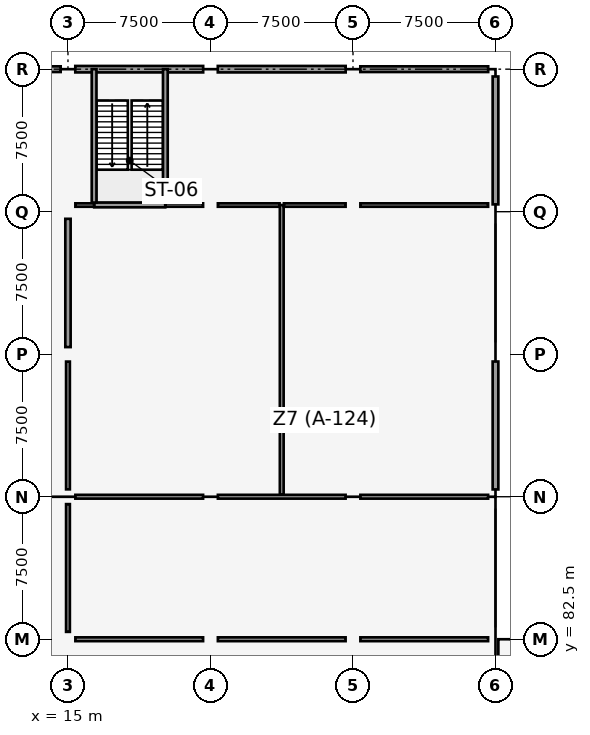
"""IFC4 building model, lengths in metres.
Left out: names, types, materials, properties, quantities, classifications, styles, units other than length and angle.
Written with IfcOpenShell. Run it as: python <this file> out.ifc"""

import sys

from ifc_helpers import new_model, si_unit, direction, frame, frame_2d, origin, origin_2d, place, context, subcontext, project, spatial, rectangle, extrude, element, fill, save


model = new_model("IFC4")
c1 = context("Model", 3, precision=1e-05, world=origin(), true_north=direction((0.0, 1.0)))
c2 = subcontext(c1, "Body", "Model", "MODEL_VIEW")
j1 = project(units=[si_unit("LENGTHUNIT", "METRE"), si_unit("PLANEANGLEUNIT", "RADIAN")], contexts=[c1])
p1 = place(None, origin())
s1 = spatial("IfcSite", under=j1, at=p1, CompositionType="ELEMENT")
p2 = place(p1, origin())
s2 = spatial("IfcBuilding", under=s1, at=p2, CompositionType="ELEMENT")
p3 = place(p2, origin())
s3 = spatial("IfcBuildingStorey", under=s2, at=p3, CompositionType="ELEMENT", Elevation=0.0)
for number, where, z_axis, x_axis in (
    (1, (15.0, 82.5, 0.0), (0.0, 0.0, 1.0), (1.0, 0.0, 0.0)),
    (2, (15.0, 90.0, 0.0), (0.0, 0.0, 1.0), (1.0, 0.0, 0.0)),
    (3, (15.0, 97.5, 0.0), (0.0, 0.0, 1.0), (1.0, 0.0, 0.0)),
    (4, (15.0, 105.0, 0.0), (0.0, 0.0, 1.0), (1.0, 0.0, 0.0)),
    (5, (15.0, 112.5, 0.0), (0.0, 0.0, 1.0), (1.0, 0.0, 0.0)),
    (6, (22.5, 82.5, 0.0), (0.0, 0.0, 1.0), (1.0, 0.0, 0.0)),
    (7, (22.5, 90.0, 0.0), (0.0, 0.0, 1.0), (1.0, 0.0, 0.0)),
    (8, (22.5, 97.5, 0.0), (0.0, 0.0, 1.0), (1.0, 0.0, 0.0)),
    (9, (22.5, 105.0, 0.0), (0.0, 0.0, 1.0), (1.0, 0.0, 0.0)),
    (10, (22.5, 112.5, 0.0), (0.0, 0.0, 1.0), (1.0, 0.0, 0.0)),
    (11, (30.0, 82.5, 0.0), (0.0, 0.0, 1.0), (1.0, 0.0, 0.0)),
    (12, (30.0, 90.0, 0.0), (0.0, 0.0, 1.0), (1.0, 0.0, 0.0)),
    (13, (30.0, 97.5, 0.0), (0.0, 0.0, 1.0), (1.0, 0.0, 0.0)),
    (14, (30.0, 105.0, 0.0), (0.0, 0.0, 1.0), (1.0, 0.0, 0.0)),
    (15, (30.0, 112.5, 0.0), (0.0, 0.0, 1.0), (1.0, 0.0, 0.0)),
    (16, (37.5, 82.5, 0.0), (0.0, 0.0, 1.0), (1.0, 0.0, 0.0)),
    (17, (37.5, 90.0, 0.0), (0.0, 0.0, 1.0), (1.0, 0.0, 0.0)),
    (18, (37.5, 97.5, 0.0), (0.0, 0.0, 1.0), (1.0, 0.0, 0.0)),
    (19, (37.5, 105.0, 0.0), (0.0, 0.0, 1.0), (1.0, 0.0, 0.0)),
    (20, (37.5, 112.5, 0.0), (0.0, 0.0, 1.0), (1.0, 0.0, 0.0)),
):
    element("IfcColumn", number, at=place(p3, frame(where, z_axis=z_axis, x_axis=x_axis)), inside=s3, PredefinedType="COLUMN", context=c2, shape_type="SweptSolid", body=[
        extrude(rectangle(XDim=0.75, YDim=0.75, at=origin_2d()), origin(), (0.0, 0.0, 1.0), 4.8),
    ])
p4 = place(p3, frame((15.0, 97.875, 0.0), z_axis=(0.0, 0.0, 1.0), x_axis=(0.0, 1.0, 0.0)))
e21 = element("IfcWall", 21, at=p4, inside=s3, PredefinedType="SHEAR", context=c2, shape_type="SweptSolid", body=[
    extrude(rectangle(XDim=6.75, YDim=0.28, at=frame_2d((3.375, 0.0))), origin(), (0.0, 0.0, 1.0), 4.5),
])
p5 = place(p3, frame((8.12, 112.5, 0.0), z_axis=(0.0, 0.0, 1.0), x_axis=(1.0, 0.0, 0.0)))
e22 = element("IfcWall", 22, at=p5, inside=s3, PredefinedType="SOLIDWALL", context=c2, shape_type="SweptSolid", body=[
    extrude(rectangle(XDim=6.495, YDim=0.3, at=frame_2d((3.248, 0.0))), origin(), (0.0, 0.0, 1.0), 2.97),
])
p6 = place(p5, frame((2.505, 0.0, 0.6)))
e23 = element("IfcOpeningElement", 23, at=p6, cuts=e22, PredefinedType="OPENING", context=c2, shape_type="SweptSolid", body=[
    extrude(rectangle(XDim=1.25, YDim=1.8, at=frame_2d((0.625, 0.9))), frame((0.0, 0.16, 0.0), z_axis=(0.0, -1.0, 0.0), x_axis=(1.0, 0.0, 0.0)), (0.0, 0.0, 1.0), 0.32),
])
p7 = place(p3, frame((15.385, 112.5, 0.0), z_axis=(0.0, 0.0, 1.0), x_axis=(1.0, 0.0, 0.0)))
e24 = element("IfcWall", 24, at=p7, inside=s3, PredefinedType="SOLIDWALL", context=c2, shape_type="SweptSolid", body=[
    extrude(rectangle(XDim=6.73, YDim=0.34, at=frame_2d((3.365, 0.0))), origin(), (0.0, 0.0, 1.0), 2.97),
])
p8 = place(p7, frame((2.152, 0.0, 0.0)))
e25 = element("IfcOpeningElement", 25, at=p8, cuts=e24, PredefinedType="OPENING", context=c2, shape_type="SweptSolid", body=[
    extrude(rectangle(XDim=1.8, YDim=2.2, at=frame_2d((0.9, 1.1))), frame((0.0, 0.18, 0.0), z_axis=(0.0, -1.0, 0.0), x_axis=(1.0, 0.0, 0.0)), (0.0, 0.0, 1.0), 0.36),
])
p9 = place(p3, frame((22.885, 112.5, 0.0), z_axis=(0.0, 0.0, 1.0), x_axis=(1.0, 0.0, 0.0)))
e26 = element("IfcWall", 26, at=p9, inside=s3, PredefinedType="SOLIDWALL", context=c2, shape_type="SweptSolid", body=[
    extrude(rectangle(XDim=6.73, YDim=0.34, at=frame_2d((3.365, 0.0))), origin(), (0.0, 0.0, 1.0), 3.72),
])
p10 = place(p9, frame((2.465, 0.0, 0.0)))
e27 = element("IfcOpeningElement", 27, at=p10, cuts=e26, PredefinedType="OPENING", context=c2, shape_type="SweptSolid", body=[
    extrude(rectangle(XDim=1.8, YDim=2.2, at=frame_2d((0.9, 1.1))), frame((0.0, 0.18, 0.0), z_axis=(0.0, -1.0, 0.0), x_axis=(1.0, 0.0, 0.0)), (0.0, 0.0, 1.0), 0.36),
])
p11 = place(p3, frame((30.385, 112.5, 0.0), z_axis=(0.0, 0.0, 1.0), x_axis=(1.0, 0.0, 0.0)))
e28 = element("IfcWall", 28, at=p11, inside=s3, PredefinedType="SOLIDWALL", context=c2, shape_type="SweptSolid", body=[
    extrude(rectangle(XDim=6.73, YDim=0.3, at=frame_2d((3.365, 0.0))), origin(), (0.0, 0.0, 1.0), 3.72),
])
p12 = place(p11, frame((2.515, 0.0, 0.6)))
e29 = element("IfcOpeningElement", 29, at=p12, cuts=e28, PredefinedType="OPENING", context=c2, shape_type="SweptSolid", body=[
    extrude(rectangle(XDim=1.7, YDim=1.8, at=frame_2d((0.85, 0.9))), frame((0.0, 0.16, 0.0), z_axis=(0.0, -1.0, 0.0), x_axis=(1.0, 0.0, 0.0)), (0.0, 0.0, 1.0), 0.32),
])
p13 = place(p3, frame((37.5, 90.385, 0.0), z_axis=(0.0, 0.0, 1.0), x_axis=(0.0, 1.0, 0.0)))
e30 = element("IfcWall", 30, at=p13, inside=s3, PredefinedType="SOLIDWALL", context=c2, shape_type="SweptSolid", body=[
    extrude(rectangle(XDim=6.73, YDim=0.3, at=frame_2d((3.365, 0.0))), origin(), (0.0, 0.0, 1.0), 3.52),
])
p14 = place(p13, frame((2.765, 0.0, 0.6)))
e31 = element("IfcOpeningElement", 31, at=p14, cuts=e30, PredefinedType="OPENING", context=c2, shape_type="SweptSolid", body=[
    extrude(rectangle(XDim=1.2, YDim=1.2, at=frame_2d((0.6, 0.6))), frame((0.0, 0.16, 0.0), z_axis=(0.0, -1.0, 0.0), x_axis=(1.0, 0.0, 0.0)), (0.0, 0.0, 1.0), 0.32),
])
p15 = place(p3, frame((37.5, 105.385, 0.0), z_axis=(0.0, 0.0, 1.0), x_axis=(0.0, 1.0, 0.0)))
e32 = element("IfcWall", 32, at=p15, inside=s3, PredefinedType="SOLIDWALL", context=c2, shape_type="SweptSolid", body=[
    extrude(rectangle(XDim=6.73, YDim=0.3, at=frame_2d((3.365, 0.0))), origin(), (0.0, 0.0, 1.0), 3.67),
])
p16 = place(p15, frame((2.465, 0.0, 0.6)))
e33 = element("IfcOpeningElement", 33, at=p16, cuts=e32, PredefinedType="OPENING", context=c2, shape_type="SweptSolid", body=[
    extrude(rectangle(XDim=1.8, YDim=1.2, at=frame_2d((0.9, 0.6))), frame((0.0, 0.16, 0.0), z_axis=(0.0, -1.0, 0.0), x_axis=(1.0, 0.0, 0.0)), (0.0, 0.0, 1.0), 0.32),
])
p17 = place(p3, frame((16.38, 105.355, 0.0), z_axis=(0.0, 0.0, 1.0), x_axis=(1.0, 0.0, 0.0)))
e34 = element("IfcWall", 34, at=p17, inside=s3, PredefinedType="SOLIDWALL", context=c2, shape_type="SweptSolid", body=[
    extrude(rectangle(XDim=3.74, YDim=0.25, at=frame_2d((1.87, 0.0))), origin(), (0.0, 0.0, 1.0), 4.5),
])
p18 = place(p3, frame((16.375, 105.48, 0.0), z_axis=(0.0, 0.0, 1.0), x_axis=(0.0, 1.0, 0.0)))
e35 = element("IfcWall", 35, at=p18, inside=s3, PredefinedType="SOLIDWALL", context=c2, shape_type="SweptSolid", body=[
    extrude(rectangle(XDim=7.02, YDim=0.25, at=frame_2d((3.51, 0.0))), origin(), (0.0, 0.0, 1.0), 4.5),
])
p19 = place(p18, frame((5.47, 0.0, 0.0)))
e36 = element("IfcOpeningElement", 36, at=p19, cuts=e35, PredefinedType="OPENING", context=c2, shape_type="SweptSolid", body=[
    extrude(rectangle(XDim=1.1, YDim=2.15, at=frame_2d((0.55, 1.075))), frame((0.0, 0.135, 0.0), z_axis=(0.0, -1.0, 0.0), x_axis=(1.0, 0.0, 0.0)), (0.0, 0.0, 1.0), 0.27),
])
p20 = place(p3, frame((20.125, 105.48, 0.0), z_axis=(0.0, 0.0, 1.0), x_axis=(0.0, 1.0, 0.0)))
e37 = element("IfcWall", 37, at=p20, inside=s3, PredefinedType="SOLIDWALL", context=c2, shape_type="SweptSolid", body=[
    extrude(rectangle(XDim=7.02, YDim=0.25, at=frame_2d((3.51, 0.0))), origin(), (0.0, 0.0, 1.0), 4.5),
])
p21 = place(p3, frame((15.389, 105.35, 0.0), z_axis=(0.0, 0.0, 1.0), x_axis=(1.0, 0.0, 0.0)))
e38 = element("IfcWall", 38, at=p21, inside=s3, PredefinedType="PARTITIONING", context=c2, shape_type="SweptSolid", body=[
    extrude(rectangle(XDim=0.991, YDim=0.18, at=frame_2d((0.496, 0.0))), origin(), (0.0, 0.0, 1.0), 2.97),
])
p22 = place(p3, frame((15.389, 82.5, 0.0), z_axis=(0.0, 0.0, 1.0), x_axis=(1.0, 0.0, 0.0)))
e39 = element("IfcWall", 39, at=p22, inside=s3, PredefinedType="PARTITIONING", context=c2, shape_type="SweptSolid", body=[
    extrude(rectangle(XDim=6.722, YDim=0.2, at=frame_2d((3.361, 0.0))), origin(), (0.0, 0.0, 1.0), 2.97),
])
p23 = place(p3, frame((22.889, 82.5, 0.0), z_axis=(0.0, 0.0, 1.0), x_axis=(1.0, 0.0, 0.0)))
e40 = element("IfcWall", 40, at=p23, inside=s3, PredefinedType="PARTITIONING", context=c2, shape_type="SweptSolid", body=[
    extrude(rectangle(XDim=6.722, YDim=0.2, at=frame_2d((3.361, 0.0))), origin(), (0.0, 0.0, 1.0), 3.42),
])
p24 = place(p23, frame((2.761, 0.0, 0.0)))
e41 = element("IfcOpeningElement", 41, at=p24, cuts=e40, PredefinedType="OPENING", context=c2, shape_type="SweptSolid", body=[
    extrude(rectangle(XDim=1.2, YDim=2.15, at=frame_2d((0.6, 1.075))), frame((0.0, 0.11, 0.0), z_axis=(0.0, -1.0, 0.0), x_axis=(1.0, 0.0, 0.0)), (0.0, 0.0, 1.0), 0.22),
])
p25 = place(p3, frame((30.389, 82.5, 0.0), z_axis=(0.0, 0.0, 1.0), x_axis=(1.0, 0.0, 0.0)))
e42 = element("IfcWall", 42, at=p25, inside=s3, PredefinedType="PARTITIONING", context=c2, shape_type="SweptSolid", body=[
    extrude(rectangle(XDim=6.722, YDim=0.2, at=frame_2d((3.361, 0.0))), origin(), (0.0, 0.0, 1.0), 3.42),
])
p26 = place(p3, frame((15.389, 90.0, 0.0), z_axis=(0.0, 0.0, 1.0), x_axis=(1.0, 0.0, 0.0)))
e43 = element("IfcWall", 43, at=p26, inside=s3, PredefinedType="PARTITIONING", context=c2, shape_type="SweptSolid", body=[
    extrude(rectangle(XDim=6.722, YDim=0.2, at=frame_2d((3.361, 0.0))), origin(), (0.0, 0.0, 1.0), 2.97),
])
for number, where, z_axis, x_axis in (
    (44, (22.889, 90.0, 0.0), (0.0, 0.0, 1.0), (1.0, 0.0, 0.0)),
    (45, (30.389, 90.0, 0.0), (0.0, 0.0, 1.0), (1.0, 0.0, 0.0)),
):
    element("IfcWall", number, at=place(p3, frame(where, z_axis=z_axis, x_axis=x_axis)), inside=s3, PredefinedType="PARTITIONING", context=c2, shape_type="SweptSolid", body=[
        extrude(rectangle(XDim=6.722, YDim=0.2, at=frame_2d((3.361, 0.0))), origin(), (0.0, 0.0, 1.0), 3.42),
    ])
p27 = place(p3, frame((26.25, 90.114, 0.0), z_axis=(0.0, 0.0, 1.0), x_axis=(0.0, 1.0, 0.0)))
e46 = element("IfcWall", 46, at=p27, inside=s3, PredefinedType="PARTITIONING", context=c2, shape_type="SweptSolid", body=[
    extrude(rectangle(XDim=15.236, YDim=0.2, at=frame_2d((7.618, 0.0))), origin(), (0.0, 0.0, 1.0), 3.42),
])
p28 = place(p3, frame((20.12, 105.35, 0.0), z_axis=(0.0, 0.0, 1.0), x_axis=(1.0, 0.0, 0.0)))
e47 = element("IfcWall", 47, at=p28, inside=s3, PredefinedType="PARTITIONING", context=c2, shape_type="SweptSolid", body=[
    extrude(rectangle(XDim=1.991, YDim=0.18, at=frame_2d((0.996, 0.0))), origin(), (0.0, 0.0, 1.0), 3.42),
])
p29 = place(p3, frame((22.889, 105.35, 0.0), z_axis=(0.0, 0.0, 1.0), x_axis=(1.0, 0.0, 0.0)))
e48 = element("IfcWall", 48, at=p29, inside=s3, PredefinedType="PARTITIONING", context=c2, shape_type="SweptSolid", body=[
    extrude(rectangle(XDim=3.247, YDim=0.18, at=frame_2d((1.624, 0.0))), origin(), (0.0, 0.0, 1.0), 3.42),
])
p30 = place(p3, frame((26.364, 105.35, 0.0), z_axis=(0.0, 0.0, 1.0), x_axis=(1.0, 0.0, 0.0)))
e49 = element("IfcWall", 49, at=p30, inside=s3, PredefinedType="PARTITIONING", context=c2, shape_type="SweptSolid", body=[
    extrude(rectangle(XDim=3.247, YDim=0.18, at=frame_2d((1.624, 0.0))), origin(), (0.0, 0.0, 1.0), 3.62),
])
p31 = place(p3, frame((30.389, 105.35, 0.0), z_axis=(0.0, 0.0, 1.0), x_axis=(1.0, 0.0, 0.0)))
e50 = element("IfcWall", 50, at=p31, inside=s3, PredefinedType="PARTITIONING", context=c2, shape_type="SweptSolid", body=[
    extrude(rectangle(XDim=6.722, YDim=0.18, at=frame_2d((3.361, 0.0))), origin(), (0.0, 0.0, 1.0), 3.62),
])
p32 = place(p31, frame((2.861, 0.0, 0.0)))
e51 = element("IfcOpeningElement", 51, at=p32, cuts=e50, PredefinedType="OPENING", context=c2, shape_type="SweptSolid", body=[
    extrude(rectangle(XDim=1.0, YDim=2.12, at=frame_2d((0.5, 1.06))), frame((0.0, 0.1, 0.0), z_axis=(0.0, -1.0, 0.0), x_axis=(1.0, 0.0, 0.0)), (0.0, 0.0, 1.0), 0.2),
])
p33 = place(p3, frame((15.0, 82.889, 0.0), z_axis=(0.0, 0.0, 1.0), x_axis=(0.0, 1.0, 0.0)))
e52 = element("IfcWall", 52, at=p33, inside=s3, PredefinedType="PARTITIONING", context=c2, shape_type="SweptSolid", body=[
    extrude(rectangle(XDim=6.722, YDim=0.2, at=frame_2d((3.361, 0.0))), origin(), (0.0, 0.0, 1.0), 2.97),
])
p34 = place(p33, frame((2.761, 0.0, 0.0)))
e53 = element("IfcOpeningElement", 53, at=p34, cuts=e52, PredefinedType="OPENING", context=c2, shape_type="SweptSolid", body=[
    extrude(rectangle(XDim=1.2, YDim=2.15, at=frame_2d((0.6, 1.075))), frame((0.0, 0.11, 0.0), z_axis=(0.0, -1.0, 0.0), x_axis=(1.0, 0.0, 0.0)), (0.0, 0.0, 1.0), 0.22),
])
p35 = place(p3, frame((15.0, 90.389, 0.0), z_axis=(0.0, 0.0, 1.0), x_axis=(0.0, 1.0, 0.0)))
e54 = element("IfcWall", 54, at=p35, inside=s3, PredefinedType="PARTITIONING", context=c2, shape_type="SweptSolid", body=[
    extrude(rectangle(XDim=6.722, YDim=0.2, at=frame_2d((3.361, 0.0))), origin(), (0.0, 0.0, 1.0), 2.97),
])
p36 = place(p35, frame((2.861, 0.0, 0.0)))
e55 = element("IfcOpeningElement", 55, at=p36, cuts=e54, PredefinedType="OPENING", context=c2, shape_type="SweptSolid", body=[
    extrude(rectangle(XDim=1.0, YDim=2.12, at=frame_2d((0.5, 1.06))), frame((0.0, 0.11, 0.0), z_axis=(0.0, -1.0, 0.0), x_axis=(1.0, 0.0, 0.0)), (0.0, 0.0, 1.0), 0.22),
])
p37 = place(p8, origin())
e56 = element("IfcDoor", 56, at=p37, inside=s3, OperationType="SINGLE_SWING_RIGHT", PredefinedType="DOOR", context=c2, shape_type="SweptSolid", body=[
    extrude(rectangle(XDim=1.8, YDim=2.2, at=frame_2d((0.9, 1.1))), frame((0.0, 0.025, 0.0), z_axis=(0.0, -1.0, 0.0), x_axis=(1.0, 0.0, 0.0)), (0.0, 0.0, 1.0), 0.05),
])
fill(e25, e56)
p38 = place(p10, origin())
e57 = element("IfcDoor", 57, at=p38, inside=s3, OperationType="SINGLE_SWING_LEFT", PredefinedType="DOOR", context=c2, shape_type="SweptSolid", body=[
    extrude(rectangle(XDim=1.8, YDim=2.2, at=frame_2d((0.9, 1.1))), frame((0.0, 0.025, 0.0), z_axis=(0.0, -1.0, 0.0), x_axis=(1.0, 0.0, 0.0)), (0.0, 0.0, 1.0), 0.05),
])
fill(e27, e57)
p39 = place(p12, origin())
e58 = element("IfcWindow", 58, at=p39, inside=s3, PartitioningType="SINGLE_PANEL", PredefinedType="WINDOW", context=c2, shape_type="SweptSolid", body=[
    extrude(rectangle(XDim=1.7, YDim=1.8, at=frame_2d((0.85, 0.9))), frame((0.0, 0.03, 0.0), z_axis=(0.0, -1.0, 0.0), x_axis=(1.0, 0.0, 0.0)), (0.0, 0.0, 1.0), 0.06),
])
fill(e29, e58)
p40 = place(p14, origin())
e59 = element("IfcWindow", 59, at=p40, inside=s3, PartitioningType="SINGLE_PANEL", PredefinedType="WINDOW", context=c2, shape_type="SweptSolid", body=[
    extrude(rectangle(XDim=1.2, YDim=1.2, at=frame_2d((0.6, 0.6))), frame((0.0, 0.03, 0.0), z_axis=(0.0, -1.0, 0.0), x_axis=(1.0, 0.0, 0.0)), (0.0, 0.0, 1.0), 0.06),
])
fill(e31, e59)
p41 = place(p16, origin())
e60 = element("IfcWindow", 60, at=p41, inside=s3, PartitioningType="SINGLE_PANEL", PredefinedType="WINDOW", context=c2, shape_type="SweptSolid", body=[
    extrude(rectangle(XDim=1.8, YDim=1.2, at=frame_2d((0.9, 0.6))), frame((0.0, 0.03, 0.0), z_axis=(0.0, -1.0, 0.0), x_axis=(1.0, 0.0, 0.0)), (0.0, 0.0, 1.0), 0.06),
])
fill(e33, e60)
p42 = place(p19, origin())
e61 = element("IfcDoor", 61, at=p42, inside=s3, OperationType="SINGLE_SWING_LEFT", PredefinedType="DOOR", context=c2, shape_type="SweptSolid", body=[
    extrude(rectangle(XDim=1.1, YDim=2.15, at=frame_2d((0.55, 1.075))), frame((0.0, 0.025, 0.0), z_axis=(0.0, -1.0, 0.0), x_axis=(1.0, 0.0, 0.0)), (0.0, 0.0, 1.0), 0.05),
])
fill(e36, e61)
p43 = place(p24, origin())
e62 = element("IfcDoor", 62, at=p43, inside=s3, OperationType="SINGLE_SWING_LEFT", PredefinedType="DOOR", context=c2, shape_type="SweptSolid", body=[
    extrude(rectangle(XDim=1.2, YDim=2.15, at=frame_2d((0.6, 1.075))), frame((0.0, 0.025, 0.0), z_axis=(0.0, -1.0, 0.0), x_axis=(1.0, 0.0, 0.0)), (0.0, 0.0, 1.0), 0.05),
])
fill(e41, e62)
p44 = place(p32, origin())
e63 = element("IfcDoor", 63, at=p44, inside=s3, OperationType="SINGLE_SWING_RIGHT", PredefinedType="DOOR", context=c2, shape_type="SweptSolid", body=[
    extrude(rectangle(XDim=1.0, YDim=2.12, at=frame_2d((0.5, 1.06))), frame((0.0, 0.025, 0.0), z_axis=(0.0, -1.0, 0.0), x_axis=(1.0, 0.0, 0.0)), (0.0, 0.0, 1.0), 0.05),
])
fill(e51, e63)
p45 = place(p34, origin())
e64 = element("IfcDoor", 64, at=p45, inside=s3, OperationType="SINGLE_SWING_LEFT", PredefinedType="DOOR", context=c2, shape_type="SweptSolid", body=[
    extrude(rectangle(XDim=1.2, YDim=2.15, at=frame_2d((0.6, 1.075))), frame((0.0, 0.025, 0.0), z_axis=(0.0, -1.0, 0.0), x_axis=(1.0, 0.0, 0.0)), (0.0, 0.0, 1.0), 0.05),
])
fill(e53, e64)
p46 = place(p36, origin())
e65 = element("IfcDoor", 65, at=p46, inside=s3, OperationType="SINGLE_SWING_RIGHT", PredefinedType="DOOR", context=c2, shape_type="SweptSolid", body=[
    extrude(rectangle(XDim=1.0, YDim=2.12, at=frame_2d((0.5, 1.06))), frame((0.0, 0.025, 0.0), z_axis=(0.0, -1.0, 0.0), x_axis=(1.0, 0.0, 0.0)), (0.0, 0.0, 1.0), 0.05),
])
fill(e55, e65)
save(model, sys.argv[1])
